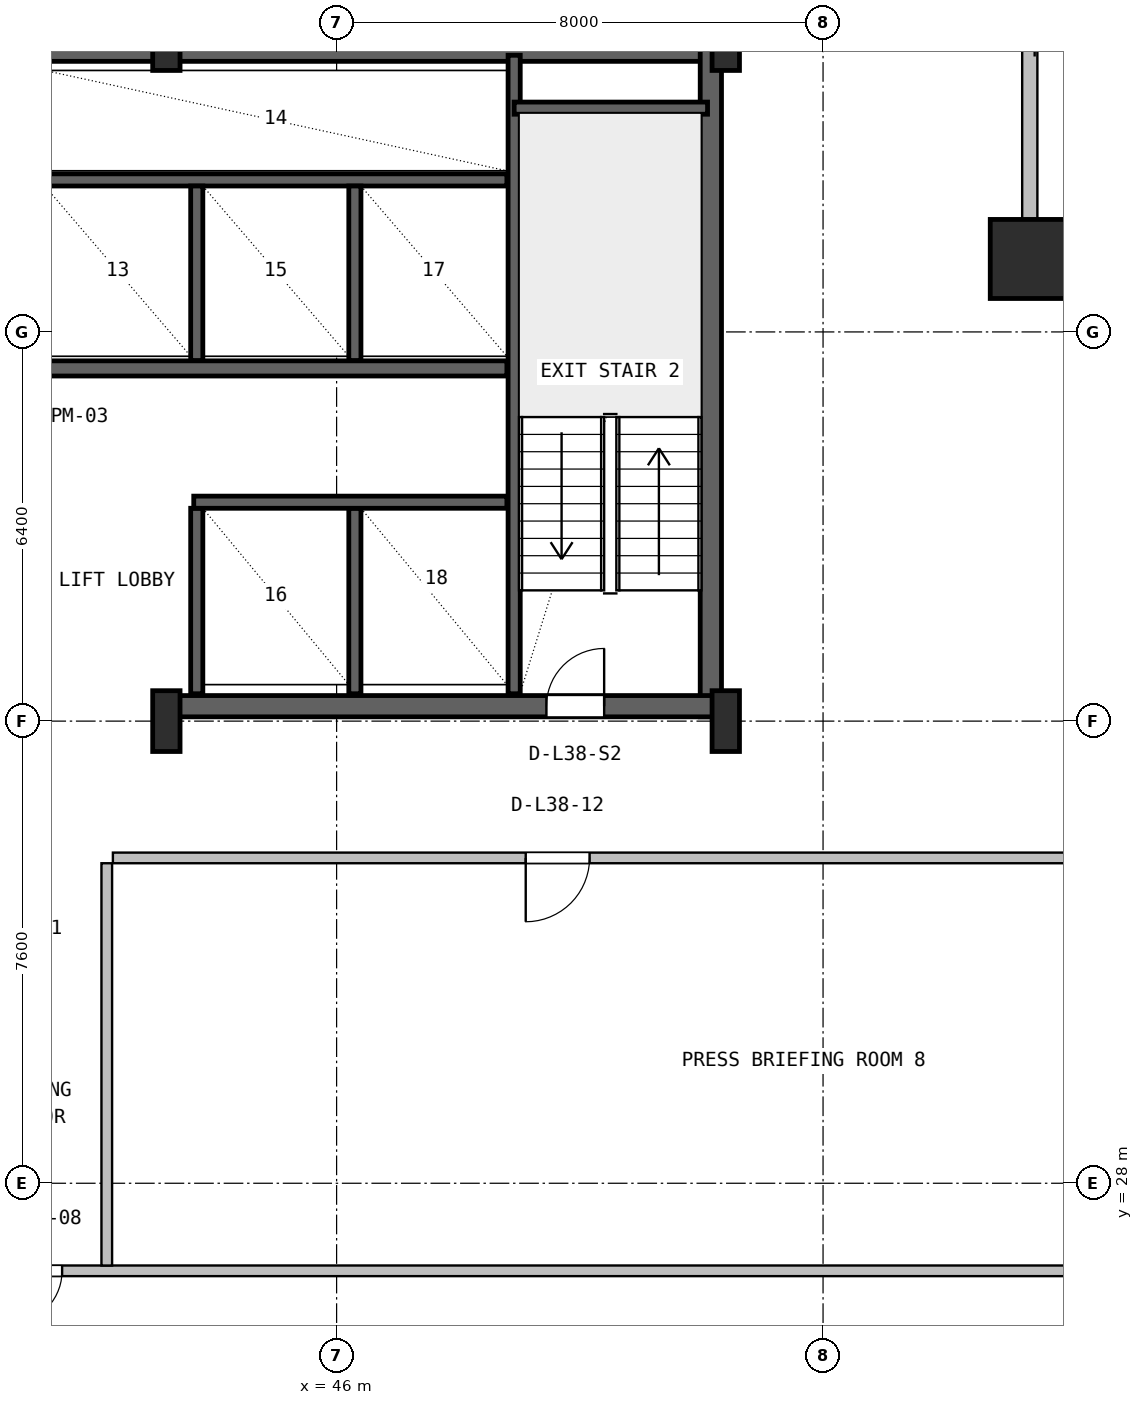
"""IFC4 building model, lengths in metres.
Left out: names, types, materials, properties, quantities, classifications, styles, units other than length and angle.
Written with IfcOpenShell. Run it as: python <this file> out.ifc"""

import sys

from ifc_helpers import new_model, si_unit, direction, frame, frame_2d, origin, origin_2d, place, context, subcontext, project, spatial, rectangle, hollow_rectangle, i_section, extrude, source, transform, mapped, element, fill, save


model = new_model("IFC4")
c1 = context("Model", 3, precision=1e-05, world=origin(), true_north=direction((0.0, 1.0)))
c2 = subcontext(c1, "Body", "Model", "MODEL_VIEW")
j1 = project(units=[si_unit("LENGTHUNIT", "METRE"), si_unit("PLANEANGLEUNIT", "RADIAN")], contexts=[c1])
p1 = place(None, origin())
s1 = spatial("IfcSite", under=j1, at=p1, CompositionType="ELEMENT")
p2 = place(p1, origin())
s2 = spatial("IfcBuilding", under=s1, at=p2, CompositionType="ELEMENT")
p3 = place(p2, frame((0.0, 0.0, 157.2)))
s3 = spatial("IfcBuildingStorey", under=s2, at=p3, CompositionType="ELEMENT", Elevation=157.2)
p4 = place(p3, frame((15.6, 46.625, 0.0), z_axis=(0.0, 0.0, 1.0), x_axis=(1.0, 0.0, 0.0)))
e1 = element("IfcWall", 1, at=p4, inside=s3, PredefinedType="SHEAR", context=c2, shape_type="SweptSolid", body=[
    extrude(rectangle(XDim=36.8, YDim=0.35, at=frame_2d((18.4, 0.0))), origin(), (0.0, 0.0, 1.0), 3.55),
])
p5 = place(p3, frame((52.155, 35.67, 0.0), z_axis=(0.0, 0.0, 1.0), x_axis=(0.0, 1.0, 0.0)))
e2 = element("IfcWall", 2, at=p5, inside=s3, PredefinedType="SHEAR", context=c2, shape_type="SweptSolid", body=[
    extrude(rectangle(XDim=11.13, YDim=0.35, at=frame_2d((5.565, 0.0))), origin(), (0.0, 0.0, 1.0), 3.55),
])
p6 = place(p3, frame((43.2, 35.845, 0.0), z_axis=(0.0, 0.0, 1.0), x_axis=(1.0, 0.0, 0.0)))
e3 = element("IfcWall", 3, at=p6, inside=s3, PredefinedType="SHEAR", context=c2, shape_type="SweptSolid", body=[
    extrude(rectangle(XDim=9.13, YDim=0.35, at=frame_2d((4.565, 0.0))), origin(), (0.0, 0.0, 1.0), 3.55),
])
p7 = place(p6, frame((6.25, 0.0, 0.0)))
e4 = element("IfcOpeningElement", 4, at=p7, cuts=e3, PredefinedType="OPENING", context=c2, shape_type="SweptSolid", body=[
    extrude(rectangle(XDim=0.95, YDim=2.1, at=frame_2d((0.475, 1.05))), frame((0.0, 0.185, 0.0), z_axis=(0.0, -1.0, 0.0), x_axis=(1.0, 0.0, 0.0)), (0.0, 0.0, 1.0), 0.37),
])
m1 = source(origin(), c2, "Body", "SweptSolid", [
    extrude(i_section(OverallWidth=0.45, OverallDepth=1.0, WebThickness=0.016, FlangeThickness=0.03, FilletRadius=0.016, at=origin_2d()), origin(), (0.0, 0.0, 1.0), 3.8),
])
for number, where, z_axis, x_axis in (
    (5, (43.2, 35.6, 0.0), (0.0, 0.0, 1.0), (1.0, 0.0, 0.0)),
    (6, (43.2, 46.8, 0.0), (0.0, 0.0, 1.0), (1.0, 0.0, 0.0)),
    (7, (52.4, 35.6, 0.0), (0.0, 0.0, 1.0), (1.0, 0.0, 0.0)),
    (8, (52.4, 46.8, 0.0), (0.0, 0.0, 1.0), (1.0, 0.0, 0.0)),
):
    element("IfcColumn", number, at=place(p3, frame(where, z_axis=z_axis, x_axis=x_axis)), inside=s3, PredefinedType="COLUMN", context=c2, shape_type="MappedRepresentation", body=[
        mapped(m1, transform((0.0, 0.0, 0.0), x_axis=(1.0, 0.0, 0.0), y_axis=(0.0, 1.0, 0.0), z_axis=(0.0, 0.0, 1.0), scale=1.0)),
    ])
m2 = source(origin(), c2, "Body", "SweptSolid", [
    extrude(hollow_rectangle(XDim=1.3, YDim=1.3, WallThickness=0.05, at=origin_2d()), origin(), (0.0, 0.0, 1.0), 3.8),
])
p8 = place(p3, frame((57.4, 43.2, 0.0), z_axis=(0.0, 0.0, 1.0), x_axis=(1.0, 0.0, 0.0)))
e9 = element("IfcColumn", 9, at=p8, inside=s3, PredefinedType="COLUMN", context=c2, shape_type="MappedRepresentation", body=[
    mapped(m2, transform((0.0, 0.0, 0.0), x_axis=(1.0, 0.0, 0.0), y_axis=(0.0, 1.0, 0.0), z_axis=(0.0, 0.0, 1.0), scale=1.0)),
])
p9 = place(p3, frame((57.53, 43.2, 0.0), z_axis=(0.0, 0.0, 1.0), x_axis=(1.0, 0.0, 0.0)))
e10 = element("IfcWall", 10, at=p9, inside=s3, PredefinedType="SOLIDWALL", context=c2, shape_type="SweptSolid", body=[
    extrude(rectangle(XDim=3.39, YDim=0.25, at=frame_2d((1.695, 0.0))), origin(), (0.0, 0.0, 1.0), 3.53),
])
p10 = place(p3, frame((57.4, 43.12, 0.0), z_axis=(0.0, 0.0, 1.0), x_axis=(0.0, 1.0, 0.0)))
e11 = element("IfcWall", 11, at=p10, inside=s3, PredefinedType="SOLIDWALL", context=c2, shape_type="SweptSolid", body=[
    extrude(rectangle(XDim=3.6, YDim=0.25, at=frame_2d((1.8, 0.0))), origin(), (0.0, 0.0, 1.0), 3.108),
])
p11 = place(p3, frame((48.92, 36.05, 0.0), z_axis=(0.0, 0.0, 1.0), x_axis=(0.0, 1.0, 0.0)))
e12 = element("IfcWall", 12, at=p11, inside=s3, PredefinedType="SHEAR", context=c2, shape_type="SweptSolid", body=[
    extrude(rectangle(XDim=10.5, YDim=0.2, at=frame_2d((5.25, 0.0))), origin(), (0.0, 0.0, 1.0), 3.55),
])
p12 = place(p3, frame((48.92, 45.68, 0.0), z_axis=(0.0, 0.0, 1.0), x_axis=(1.0, 0.0, 0.0)))
e13 = element("IfcWall", 13, at=p12, inside=s3, PredefinedType="SHEAR", context=c2, shape_type="SweptSolid", body=[
    extrude(rectangle(XDim=3.18, YDim=0.2, at=frame_2d((1.59, 0.0))), origin(), (0.0, 0.0, 1.0), 3.55),
])
p13 = place(p3, frame((24.98, 41.4, 0.0), z_axis=(0.0, 0.0, 1.0), x_axis=(1.0, 0.0, 0.0)))
e14 = element("IfcWall", 14, at=p13, inside=s3, PredefinedType="SHEAR", context=c2, shape_type="SweptSolid", body=[
    extrude(rectangle(XDim=23.82, YDim=0.25, at=frame_2d((11.91, 0.0))), origin(), (0.0, 0.0, 1.0), 3.55),
])
p14 = place(p13, frame((8.87, 0.0, 0.0)))
e15 = element("IfcOpeningElement", 15, at=p14, cuts=e14, PredefinedType="OPENING", context=c2, shape_type="SweptSolid", body=[
    extrude(rectangle(XDim=1.1, YDim=2.18, at=frame_2d((0.55, 1.09))), frame((0.0, 0.135, 0.0), z_axis=(0.0, -1.0, 0.0), x_axis=(1.0, 0.0, 0.0)), (0.0, 0.0, 1.0), 0.27),
])
p15 = place(p13, frame((11.47, 0.0, 0.0)))
e16 = element("IfcOpeningElement", 16, at=p15, cuts=e14, PredefinedType="OPENING", context=c2, shape_type="SweptSolid", body=[
    extrude(rectangle(XDim=1.1, YDim=2.18, at=frame_2d((0.55, 1.09))), frame((0.0, 0.135, 0.0), z_axis=(0.0, -1.0, 0.0), x_axis=(1.0, 0.0, 0.0)), (0.0, 0.0, 1.0), 0.27),
])
p16 = place(p13, frame((14.07, 0.0, 0.0)))
e17 = element("IfcOpeningElement", 17, at=p16, cuts=e14, PredefinedType="OPENING", context=c2, shape_type="SweptSolid", body=[
    extrude(rectangle(XDim=1.1, YDim=2.18, at=frame_2d((0.55, 1.09))), frame((0.0, 0.135, 0.0), z_axis=(0.0, -1.0, 0.0), x_axis=(1.0, 0.0, 0.0)), (0.0, 0.0, 1.0), 0.27),
])
p17 = place(p13, frame((1.81, 0.0, 0.0)))
e18 = element("IfcOpeningElement", 18, at=p17, cuts=e14, PredefinedType="OPENING", context=c2, shape_type="SweptSolid", body=[
    extrude(rectangle(XDim=0.92, YDim=2.08, at=frame_2d((0.46, 1.04))), frame((0.0, 0.135, 0.0), z_axis=(0.0, -1.0, 0.0), x_axis=(1.0, 0.0, 0.0)), (0.0, 0.0, 1.0), 0.27),
])
p18 = place(p13, frame((5.71, 0.0, 0.0)))
e19 = element("IfcOpeningElement", 19, at=p18, cuts=e14, PredefinedType="OPENING", context=c2, shape_type="SweptSolid", body=[
    extrude(rectangle(XDim=0.92, YDim=2.08, at=frame_2d((0.46, 1.04))), frame((0.0, 0.135, 0.0), z_axis=(0.0, -1.0, 0.0), x_axis=(1.0, 0.0, 0.0)), (0.0, 0.0, 1.0), 0.27),
])
p19 = place(p3, frame((41.22, 44.5, 0.0), z_axis=(0.0, 0.0, 1.0), x_axis=(1.0, 0.0, 0.0)))
e20 = element("IfcWall", 20, at=p19, inside=s3, PredefinedType="SHEAR", context=c2, shape_type="SweptSolid", body=[
    extrude(rectangle(XDim=7.58, YDim=0.2, at=frame_2d((3.79, 0.0))), origin(), (0.0, 0.0, 1.0), 3.55),
])
for number, where, z_axis, x_axis in (
    (21, (43.7, 41.53, 0.0), (0.0, 0.0, 1.0), (0.0, 1.0, 0.0)),
    (22, (46.3, 41.53, 0.0), (0.0, 0.0, 1.0), (0.0, 1.0, 0.0)),
):
    element("IfcWall", number, at=place(p3, frame(where, z_axis=z_axis, x_axis=x_axis)), inside=s3, PredefinedType="SHEAR", context=c2, shape_type="SweptSolid", body=[
        extrude(rectangle(XDim=2.87, YDim=0.2, at=frame_2d((1.435, 0.0))), origin(), (0.0, 0.0, 1.0), 3.55),
    ])
for number, where, z_axis, x_axis in (
    (23, (43.7, 36.05, 0.0), (0.0, 0.0, 1.0), (0.0, 1.0, 0.0)),
    (24, (46.3, 36.05, 0.0), (0.0, 0.0, 1.0), (0.0, 1.0, 0.0)),
):
    element("IfcWall", number, at=place(p3, frame(where, z_axis=z_axis, x_axis=x_axis)), inside=s3, PredefinedType="SHEAR", context=c2, shape_type="SweptSolid", body=[
        extrude(rectangle(XDim=3.05, YDim=0.2, at=frame_2d((1.525, 0.0))), origin(), (0.0, 0.0, 1.0), 3.55),
    ])
p20 = place(p3, frame((43.65, 39.2, 0.0), z_axis=(0.0, 0.0, 1.0), x_axis=(1.0, 0.0, 0.0)))
e25 = element("IfcWall", 25, at=p20, inside=s3, PredefinedType="SHEAR", context=c2, shape_type="SweptSolid", body=[
    extrude(rectangle(XDim=5.15, YDim=0.2, at=frame_2d((2.575, 0.0))), origin(), (0.0, 0.0, 1.0), 3.55),
])
p21 = place(p3, frame((7.18, 26.56, 0.0), z_axis=(0.0, 0.0, 1.0), x_axis=(1.0, 0.0, 0.0)))
e26 = element("IfcWall", 26, at=p21, inside=s3, PredefinedType="PARTITIONING", context=c2, shape_type="SweptSolid", body=[
    extrude(rectangle(XDim=53.64, YDim=0.175, at=frame_2d((26.82, 0.0))), origin(), (0.0, 0.0, 1.0), 2.909),
])
p22 = place(p21, frame((21.4, 0.0, 0.0)))
e27 = element("IfcOpeningElement", 27, at=p22, cuts=e26, PredefinedType="OPENING", context=c2, shape_type="SweptSolid", body=[
    extrude(rectangle(XDim=1.05, YDim=2.1, at=frame_2d((0.525, 1.05))), frame((0.0, 0.098, 0.0), z_axis=(0.0, -1.0, 0.0), x_axis=(1.0, 0.0, 0.0)), (0.0, 0.0, 1.0), 0.195),
])
p23 = place(p21, frame((25.205, 0.0, 0.0)))
e28 = element("IfcOpeningElement", 28, at=p23, cuts=e26, PredefinedType="OPENING", context=c2, shape_type="SweptSolid", body=[
    extrude(rectangle(XDim=1.05, YDim=2.1, at=frame_2d((0.525, 1.05))), frame((0.0, 0.098, 0.0), z_axis=(0.0, -1.0, 0.0), x_axis=(1.0, 0.0, 0.0)), (0.0, 0.0, 1.0), 0.195),
])
p24 = place(p21, frame((29.825, 0.0, 0.0)))
e29 = element("IfcOpeningElement", 29, at=p24, cuts=e26, PredefinedType="OPENING", context=c2, shape_type="SweptSolid", body=[
    extrude(rectangle(XDim=1.4, YDim=2.12, at=frame_2d((0.7, 1.06))), frame((0.0, 0.098, 0.0), z_axis=(0.0, -1.0, 0.0), x_axis=(1.0, 0.0, 0.0)), (0.0, 0.0, 1.0), 0.195),
])
p25 = place(p21, frame((33.425, 0.0, 0.0)))
e30 = element("IfcOpeningElement", 30, at=p25, cuts=e26, PredefinedType="OPENING", context=c2, shape_type="SweptSolid", body=[
    extrude(rectangle(XDim=0.88, YDim=2.06, at=frame_2d((0.44, 1.03))), frame((0.0, 0.098, 0.0), z_axis=(0.0, -1.0, 0.0), x_axis=(1.0, 0.0, 0.0)), (0.0, 0.0, 1.0), 0.195),
])
p26 = place(p3, frame((42.32, 33.35, 0.0), z_axis=(0.0, 0.0, 1.0), x_axis=(1.0, 0.0, 0.0)))
e31 = element("IfcWall", 31, at=p26, inside=s3, PredefinedType="PARTITIONING", context=c2, shape_type="SweptSolid", body=[
    extrude(rectangle(XDim=18.5, YDim=0.175, at=frame_2d((9.25, 0.0))), origin(), (0.0, 0.0, 1.0), 2.909),
])
p27 = place(p26, frame((6.79, 0.0, 0.0)))
e32 = element("IfcOpeningElement", 32, at=p27, cuts=e31, PredefinedType="OPENING", context=c2, shape_type="SweptSolid", body=[
    extrude(rectangle(XDim=1.05, YDim=2.1, at=frame_2d((0.525, 1.05))), frame((0.0, 0.098, 0.0), z_axis=(0.0, -1.0, 0.0), x_axis=(1.0, 0.0, 0.0)), (0.0, 0.0, 1.0), 0.195),
])
p28 = place(p3, frame((42.22, 26.647, 0.0), z_axis=(0.0, 0.0, 1.0), x_axis=(0.0, 1.0, 0.0)))
e33 = element("IfcWall", 33, at=p28, inside=s3, PredefinedType="PARTITIONING", context=c2, shape_type="SweptSolid", body=[
    extrude(rectangle(XDim=6.616, YDim=0.175, at=frame_2d((3.308, 0.0))), origin(), (0.0, 0.0, 1.0), 3.222),
])
m3 = source(origin(), c2, "Body", "SweptSolid", [
    extrude(rectangle(XDim=0.95, YDim=2.1, at=frame_2d((0.475, 1.05))), frame((0.0, 0.025, 0.0), z_axis=(0.0, -1.0, 0.0), x_axis=(1.0, 0.0, 0.0)), (0.0, 0.0, 1.0), 0.05),
])
p29 = place(p7, origin())
e34 = element("IfcDoor", 34, at=p29, inside=s3, OperationType="SINGLE_SWING_RIGHT", PredefinedType="DOOR", context=c2, shape_type="MappedRepresentation", body=[
    mapped(m3, transform((0.0, 0.0, 0.0), x_axis=(1.0, 0.0, 0.0), y_axis=(0.0, 1.0, 0.0), z_axis=(0.0, 0.0, 1.0), scale=1.0)),
])
fill(e4, e34)
m4 = source(origin(), c2, "Body", "SweptSolid", [
    extrude(rectangle(XDim=0.88, YDim=2.06, at=frame_2d((0.44, 1.03))), frame((0.0, 0.025, 0.0), z_axis=(0.0, -1.0, 0.0), x_axis=(1.0, 0.0, 0.0)), (0.0, 0.0, 1.0), 0.05),
])
p30 = place(p25, frame((0.88, 0.0, 0.0), z_axis=(0.0, 0.0, 1.0), x_axis=(-1.0, 0.0, 0.0)))
e35 = element("IfcDoor", 35, at=p30, inside=s3, OperationType="SINGLE_SWING_LEFT", PredefinedType="DOOR", context=c2, shape_type="MappedRepresentation", body=[
    mapped(m4, transform((0.0, 0.0, 0.0), x_axis=(1.0, 0.0, 0.0), y_axis=(0.0, 1.0, 0.0), z_axis=(0.0, 0.0, 1.0), scale=1.0)),
])
fill(e30, e35)
m5 = source(origin(), c2, "Body", "SweptSolid", [
    extrude(rectangle(XDim=1.05, YDim=2.1, at=frame_2d((0.525, 1.05))), frame((0.0, 0.025, 0.0), z_axis=(0.0, -1.0, 0.0), x_axis=(1.0, 0.0, 0.0)), (0.0, 0.0, 1.0), 0.05),
])
p31 = place(p27, frame((1.05, 0.0, 0.0), z_axis=(0.0, 0.0, 1.0), x_axis=(-1.0, 0.0, 0.0)))
e36 = element("IfcDoor", 36, at=p31, inside=s3, OperationType="SINGLE_SWING_LEFT", PredefinedType="DOOR", context=c2, shape_type="MappedRepresentation", body=[
    mapped(m5, transform((0.0, 0.0, 0.0), x_axis=(1.0, 0.0, 0.0), y_axis=(0.0, 1.0, 0.0), z_axis=(0.0, 0.0, 1.0), scale=1.0)),
])
fill(e32, e36)
save(model, sys.argv[1])
